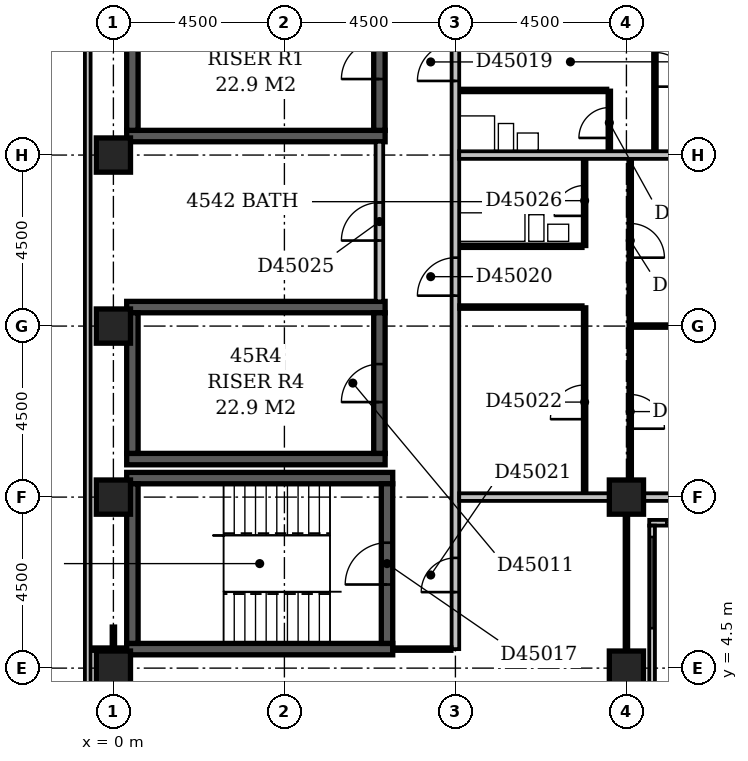
"""IFC4 building model, lengths in metres.
Left out: names, types, materials, properties, quantities, classifications, styles, units other than length and angle.
Written with IfcOpenShell. Run it as: python <this file> out.ifc"""

import sys

from ifc_helpers import new_model, si_unit, direction, frame, frame_2d, origin, origin_2d, place, context, subcontext, project, spatial, rectangle, extrude, element, fill, save


model = new_model("IFC4")
c1 = context("Model", 3, precision=1e-05, world=origin(), true_north=direction((0.0, 1.0)))
c2 = subcontext(c1, "Body", "Model", "MODEL_VIEW")
j1 = project(units=[si_unit("LENGTHUNIT", "METRE"), si_unit("PLANEANGLEUNIT", "RADIAN")], contexts=[c1])
p1 = place(None, origin())
s1 = spatial("IfcSite", under=j1, at=p1, CompositionType="ELEMENT")
p2 = place(p1, origin())
s2 = spatial("IfcBuilding", under=s1, at=p2, CompositionType="ELEMENT")
p3 = place(p2, frame((0.0, 0.0, 179.0)))
s3 = spatial("IfcBuildingStorey", under=s2, at=p3, CompositionType="ELEMENT", Elevation=179.0)
for number, where, z_axis, x_axis in (
    (1, (0.35, 5.0, -0.3), (0.0, 0.0, 1.0), (1.0, 0.0, 0.0)),
    (2, (0.35, 9.5, -0.3), (0.0, 0.0, 1.0), (1.0, 0.0, 0.0)),
):
    element("IfcWall", number, at=place(p3, frame(where, z_axis=z_axis, x_axis=x_axis)), inside=s3, PredefinedType="SHEAR", context=c2, shape_type="SweptSolid", body=[
        extrude(rectangle(XDim=7.0, YDim=0.3, at=frame_2d((3.5, 0.0))), origin(), (0.0, 0.0, 1.0), 3.6),
    ])
for number, where, z_axis, x_axis in (
    (3, (0.35, 10.0, -0.3), (0.0, 0.0, 1.0), (1.0, 0.0, 0.0)),
    (4, (0.35, 14.0, -0.3), (0.0, 0.0, 1.0), (1.0, 0.0, 0.0)),
    (5, (0.35, 18.5, -0.3), (0.0, 0.0, 1.0), (1.0, 0.0, 0.0)),
):
    element("IfcWall", number, at=place(p3, frame(where, z_axis=z_axis, x_axis=x_axis)), inside=s3, PredefinedType="SHEAR", context=c2, shape_type="SweptSolid", body=[
        extrude(rectangle(XDim=6.8, YDim=0.3, at=frame_2d((3.4, 0.0))), origin(), (0.0, 0.0, 1.0), 3.6),
    ])
p4 = place(p3, frame((0.5, 5.15, -0.3), z_axis=(0.0, 0.0, 1.0), x_axis=(0.0, 1.0, 0.0)))
e6 = element("IfcWall", 6, at=p4, inside=s3, PredefinedType="SHEAR", context=c2, shape_type="SweptSolid", body=[
    extrude(rectangle(XDim=4.2, YDim=0.3, at=frame_2d((2.1, 0.0))), origin(), (0.0, 0.0, 1.0), 3.6),
])
for number, where, z_axis, x_axis in (
    (7, (0.5, 10.15, -0.3), (0.0, 0.0, 1.0), (0.0, 1.0, 0.0)),
    (8, (0.5, 18.65, -0.3), (0.0, 0.0, 1.0), (0.0, 1.0, 0.0)),
):
    element("IfcWall", number, at=place(p3, frame(where, z_axis=z_axis, x_axis=x_axis)), inside=s3, PredefinedType="SHEAR", context=c2, shape_type="SweptSolid", body=[
        extrude(rectangle(XDim=3.7, YDim=0.3, at=frame_2d((1.85, 0.0))), origin(), (0.0, 0.0, 1.0), 3.6),
    ])
p5 = place(p3, frame((7.0, 10.15, -0.3), z_axis=(0.0, 0.0, 1.0), x_axis=(0.0, 1.0, 0.0)))
e9 = element("IfcWall", 9, at=p5, inside=s3, PredefinedType="SHEAR", context=c2, shape_type="SweptSolid", body=[
    extrude(rectangle(XDim=3.7, YDim=0.3, at=frame_2d((1.85, 0.0))), origin(), (0.0, 0.0, 1.0), 3.6),
])
p6 = place(p5, frame((1.35, 0.0, 0.3)))
e10 = element("IfcOpeningElement", 10, at=p6, cuts=e9, PredefinedType="OPENING", context=c2, shape_type="SweptSolid", body=[
    extrude(rectangle(XDim=1.0, YDim=2.1, at=frame_2d((0.5, 1.05))), frame((0.0, 0.162, 0.0), z_axis=(0.0, -1.0, 0.0), x_axis=(1.0, 0.0, 0.0)), (0.0, 0.0, 1.0), 0.324),
])
p7 = place(p3, frame((7.0, 18.65, -0.3), z_axis=(0.0, 0.0, 1.0), x_axis=(0.0, 1.0, 0.0)))
e11 = element("IfcWall", 11, at=p7, inside=s3, PredefinedType="SHEAR", context=c2, shape_type="SweptSolid", body=[
    extrude(rectangle(XDim=3.7, YDim=0.3, at=frame_2d((1.85, 0.0))), origin(), (0.0, 0.0, 1.0), 3.6),
])
p8 = place(p7, frame((1.35, 0.0, 0.3)))
e12 = element("IfcOpeningElement", 12, at=p8, cuts=e11, PredefinedType="OPENING", context=c2, shape_type="SweptSolid", body=[
    extrude(rectangle(XDim=1.0, YDim=2.1, at=frame_2d((0.5, 1.05))), frame((0.0, 0.162, 0.0), z_axis=(0.0, -1.0, 0.0), x_axis=(1.0, 0.0, 0.0)), (0.0, 0.0, 1.0), 0.324),
])
p9 = place(p3, frame((7.2, 5.15, -0.3), z_axis=(0.0, 0.0, 1.0), x_axis=(0.0, 1.0, 0.0)))
e13 = element("IfcWall", 13, at=p9, inside=s3, PredefinedType="SHEAR", context=c2, shape_type="SweptSolid", body=[
    extrude(rectangle(XDim=4.2, YDim=0.3, at=frame_2d((2.1, 0.0))), origin(), (0.0, 0.0, 1.0), 3.6),
])
p10 = place(p9, frame((1.55, 0.0, 0.3)))
e14 = element("IfcOpeningElement", 14, at=p10, cuts=e13, PredefinedType="OPENING", context=c2, shape_type="SweptSolid", body=[
    extrude(rectangle(XDim=1.1, YDim=2.1, at=frame_2d((0.55, 1.05))), frame((0.0, 0.162, 0.0), z_axis=(0.0, -1.0, 0.0), x_axis=(1.0, 0.0, 0.0)), (0.0, 0.0, 1.0), 0.324),
])
for number, where, z_axis, x_axis in (
    (15, (0.0, 4.5, -0.3), (0.0, 0.0, 1.0), (1.0, 0.0, 0.0)),
    (16, (13.5, 4.5, -0.3), (0.0, 0.0, 1.0), (1.0, 0.0, 0.0)),
    (17, (0.0, 9.0, -0.3), (0.0, 0.0, 1.0), (1.0, 0.0, 0.0)),
    (18, (13.5, 9.0, -0.3), (0.0, 0.0, 1.0), (1.0, 0.0, 0.0)),
    (19, (0.0, 13.5, -0.3), (0.0, 0.0, 1.0), (1.0, 0.0, 0.0)),
    (20, (0.0, 18.0, -0.3), (0.0, 0.0, 1.0), (1.0, 0.0, 0.0)),
):
    element("IfcColumn", number, at=place(p3, frame(where, z_axis=z_axis, x_axis=x_axis)), inside=s3, PredefinedType="COLUMN", context=c2, shape_type="SweptSolid", body=[
        extrude(rectangle(XDim=0.9, YDim=0.9, at=origin_2d()), origin(), (0.0, 0.0, 1.0), 3.6),
    ])
p11 = place(p3, frame((14.175, 3.9, 0.0), z_axis=(0.0, 0.0, 1.0), x_axis=(0.0, 1.0, 0.0)))
e21 = element("IfcWall", 21, at=p11, inside=s3, PredefinedType="STANDARD", context=c2, shape_type="SweptSolid", body=[
    extrude(rectangle(XDim=4.35, YDim=0.15, at=frame_2d((2.175, 0.0))), origin(), (0.0, 0.0, 1.0), 2.7),
])
p12 = place(p11, frame((1.65, 0.0, 0.6)))
e22 = element("IfcOpeningElement", 22, at=p12, cuts=e21, PredefinedType="OPENING", context=c2, shape_type="SweptSolid", body=[
    extrude(rectangle(XDim=2.4, YDim=1.8, at=frame_2d((1.2, 0.9))), frame((0.0, 0.087, 0.0), z_axis=(0.0, -1.0, 0.0), x_axis=(1.0, 0.0, 0.0)), (0.0, 0.0, 1.0), 0.174),
])
p13 = place(p3, frame((14.1, 8.325, 0.0), z_axis=(0.0, 0.0, 1.0), x_axis=(1.0, 0.0, 0.0)))
e23 = element("IfcWall", 23, at=p13, inside=s3, PredefinedType="STANDARD", context=c2, shape_type="SweptSolid", body=[
    extrude(rectangle(XDim=4.65, YDim=0.15, at=frame_2d((2.325, 0.0))), origin(), (0.0, 0.0, 1.0), 2.7),
])
p14 = place(p13, frame((0.45, 0.0, 0.6)))
e24 = element("IfcOpeningElement", 24, at=p14, cuts=e23, PredefinedType="OPENING", context=c2, shape_type="SweptSolid", body=[
    extrude(rectangle(XDim=2.4, YDim=1.8, at=frame_2d((1.2, 0.9))), frame((0.0, 0.087, 0.0), z_axis=(0.0, -1.0, 0.0), x_axis=(1.0, 0.0, 0.0)), (0.0, 0.0, 1.0), 0.174),
])
p15 = place(p3, frame((-0.675, 59.1, 0.0), z_axis=(0.0, 0.0, 1.0), x_axis=(0.0, -1.0, 0.0)))
e25 = element("IfcWall", 25, at=p15, inside=s3, PredefinedType="STANDARD", context=c2, shape_type="SweptSolid", body=[
    extrude(rectangle(XDim=55.35, YDim=0.15, at=frame_2d((27.675, 0.0))), origin(), (0.0, 0.0, 1.0), 2.7),
])
p16 = place(p3, frame((0.0, 4.95, 0.0), z_axis=(0.0, 0.0, 1.0), x_axis=(0.0, 1.0, 0.0)))
e26 = element("IfcWall", 26, at=p16, inside=s3, PredefinedType="PARTITIONING", context=c2, shape_type="SweptSolid", body=[
    extrude(rectangle(XDim=0.65, YDim=0.1, at=frame_2d((0.325, 0.0))), origin(), (0.0, 0.0, 1.0), 2.7),
])
p17 = place(p3, frame((13.5, 4.95, 0.0), z_axis=(0.0, 0.0, 1.0), x_axis=(0.0, 1.0, 0.0)))
e27 = element("IfcWall", 27, at=p17, inside=s3, PredefinedType="PARTITIONING", context=c2, shape_type="SweptSolid", body=[
    extrude(rectangle(XDim=3.6, YDim=0.1, at=frame_2d((1.8, 0.0))), origin(), (0.0, 0.0, 1.0), 2.7),
])
p18 = place(p3, frame((-0.6, 5.0, 0.0), z_axis=(0.0, 0.0, 1.0), x_axis=(1.0, 0.0, 0.0)))
e28 = element("IfcWall", 28, at=p18, inside=s3, PredefinedType="PARTITIONING", context=c2, shape_type="SweptSolid", body=[
    extrude(rectangle(XDim=0.951, YDim=0.1, at=frame_2d((0.476, 0.0))), origin(), (0.0, 0.0, 1.0), 3.3),
])
p19 = place(p3, frame((7.349, 5.0, 0.0), z_axis=(0.0, 0.0, 1.0), x_axis=(1.0, 0.0, 0.0)))
e29 = element("IfcWall", 29, at=p19, inside=s3, PredefinedType="PARTITIONING", context=c2, shape_type="SweptSolid", body=[
    extrude(rectangle(XDim=1.551, YDim=0.1, at=frame_2d((0.775, 0.0))), origin(), (0.0, 0.0, 1.0), 3.3),
])
p20 = place(p3, frame((9.0, 5.0, 0.0), z_axis=(0.0, 0.0, 1.0), x_axis=(0.0, 1.0, 0.0)))
e30 = element("IfcWall", 30, at=p20, inside=s3, PredefinedType="PARTITIONING", context=c2, shape_type="SweptSolid", body=[
    extrude(rectangle(XDim=31.0, YDim=0.2, at=frame_2d((15.5, 0.0))), origin(), (0.0, 0.0, 1.0), 3.3),
])
p21 = place(p20, frame((17.8, 0.0, 0.0)))
e31 = element("IfcOpeningElement", 31, at=p21, cuts=e30, PredefinedType="OPENING", context=c2, shape_type="SweptSolid", body=[
    extrude(rectangle(XDim=1.0, YDim=2.1, at=frame_2d((0.5, 1.05))), frame((0.0, 0.112, 0.0), z_axis=(0.0, -1.0, 0.0), x_axis=(1.0, 0.0, 0.0)), (0.0, 0.0, 1.0), 0.224),
])
p22 = place(p20, frame((14.95, 0.0, 0.0)))
e32 = element("IfcOpeningElement", 32, at=p22, cuts=e30, PredefinedType="OPENING", context=c2, shape_type="SweptSolid", body=[
    extrude(rectangle(XDim=1.0, YDim=2.1, at=frame_2d((0.5, 1.05))), frame((0.0, 0.112, 0.0), z_axis=(0.0, -1.0, 0.0), x_axis=(1.0, 0.0, 0.0)), (0.0, 0.0, 1.0), 0.224),
])
p23 = place(p20, frame((9.3, 0.0, 0.0)))
e33 = element("IfcOpeningElement", 33, at=p23, cuts=e30, PredefinedType="OPENING", context=c2, shape_type="SweptSolid", body=[
    extrude(rectangle(XDim=1.0, YDim=2.1, at=frame_2d((0.5, 1.05))), frame((0.0, 0.112, 0.0), z_axis=(0.0, -1.0, 0.0), x_axis=(1.0, 0.0, 0.0)), (0.0, 0.0, 1.0), 0.224),
])
p24 = place(p20, frame((1.5, 0.0, 0.0)))
e34 = element("IfcOpeningElement", 34, at=p24, cuts=e30, PredefinedType="OPENING", context=c2, shape_type="SweptSolid", body=[
    extrude(rectangle(XDim=0.9, YDim=2.1, at=frame_2d((0.45, 1.05))), frame((0.0, 0.112, 0.0), z_axis=(0.0, -1.0, 0.0), x_axis=(1.0, 0.0, 0.0)), (0.0, 0.0, 1.0), 0.224),
])
p25 = place(p3, frame((9.1, 9.0, 0.0), z_axis=(0.0, 0.0, 1.0), x_axis=(1.0, 0.0, 0.0)))
e35 = element("IfcWall", 35, at=p25, inside=s3, PredefinedType="PARTITIONING", context=c2, shape_type="SweptSolid", body=[
    extrude(rectangle(XDim=3.95, YDim=0.2, at=frame_2d((1.975, 0.0))), origin(), (0.0, 0.0, 1.0), 3.3),
])
p26 = place(p3, frame((13.95, 9.0, 0.0), z_axis=(0.0, 0.0, 1.0), x_axis=(1.0, 0.0, 0.0)))
e36 = element("IfcWall", 36, at=p26, inside=s3, PredefinedType="PARTITIONING", context=c2, shape_type="SweptSolid", body=[
    extrude(rectangle(XDim=3.6, YDim=0.2, at=frame_2d((1.8, 0.0))), origin(), (0.0, 0.0, 1.0), 2.7),
])
p27 = place(p3, frame((12.4, 9.1, 0.0), z_axis=(0.0, 0.0, 1.0), x_axis=(0.0, 1.0, 0.0)))
e37 = element("IfcWall", 37, at=p27, inside=s3, PredefinedType="PARTITIONING", context=c2, shape_type="SweptSolid", body=[
    extrude(rectangle(XDim=4.9, YDim=0.1, at=frame_2d((2.45, 0.0))), origin(), (0.0, 0.0, 1.0), 3.3),
])
p28 = place(p27, frame((1.95, 0.0, 0.0)))
e38 = element("IfcOpeningElement", 38, at=p28, cuts=e37, PredefinedType="OPENING", context=c2, shape_type="SweptSolid", body=[
    extrude(rectangle(XDim=0.9, YDim=2.1, at=frame_2d((0.45, 1.05))), frame((0.0, 0.062, 0.0), z_axis=(0.0, -1.0, 0.0), x_axis=(1.0, 0.0, 0.0)), (0.0, 0.0, 1.0), 0.124),
])
p29 = place(p3, frame((13.6, 9.45, 0.0), z_axis=(0.0, 0.0, 1.0), x_axis=(0.0, 1.0, 0.0)))
e39 = element("IfcWall", 39, at=p29, inside=s3, PredefinedType="PARTITIONING", context=c2, shape_type="SweptSolid", body=[
    extrude(rectangle(XDim=8.45, YDim=0.1, at=frame_2d((4.225, 0.0))), origin(), (0.0, 0.0, 1.0), 3.3),
])
p30 = place(p29, frame((1.35, 0.0, 0.0)))
e40 = element("IfcOpeningElement", 40, at=p30, cuts=e39, PredefinedType="OPENING", context=c2, shape_type="SweptSolid", body=[
    extrude(rectangle(XDim=0.9, YDim=2.1, at=frame_2d((0.45, 1.05))), frame((0.0, 0.062, 0.0), z_axis=(0.0, -1.0, 0.0), x_axis=(1.0, 0.0, 0.0)), (0.0, 0.0, 1.0), 0.124),
])
p31 = place(p29, frame((5.85, 0.0, 0.0)))
e41 = element("IfcOpeningElement", 41, at=p31, cuts=e39, PredefinedType="OPENING", context=c2, shape_type="SweptSolid", body=[
    extrude(rectangle(XDim=0.9, YDim=2.1, at=frame_2d((0.45, 1.05))), frame((0.0, 0.062, 0.0), z_axis=(0.0, -1.0, 0.0), x_axis=(1.0, 0.0, 0.0)), (0.0, 0.0, 1.0), 0.124),
])
p32 = place(p3, frame((13.65, 13.5, 0.0), z_axis=(0.0, 0.0, 1.0), x_axis=(1.0, 0.0, 0.0)))
e42 = element("IfcWall", 42, at=p32, inside=s3, PredefinedType="PARTITIONING", context=c2, shape_type="SweptSolid", body=[
    extrude(rectangle(XDim=3.9, YDim=0.1, at=frame_2d((1.95, 0.0))), origin(), (0.0, 0.0, 1.0), 3.3),
])
p33 = place(p3, frame((9.1, 14.0, 0.0), z_axis=(0.0, 0.0, 1.0), x_axis=(1.0, 0.0, 0.0)))
e43 = element("IfcWall", 43, at=p33, inside=s3, PredefinedType="PARTITIONING", context=c2, shape_type="SweptSolid", body=[
    extrude(rectangle(XDim=3.25, YDim=0.1, at=frame_2d((1.625, 0.0))), origin(), (0.0, 0.0, 1.0), 3.3),
])
p34 = place(p3, frame((7.0, 14.15, 0.0), z_axis=(0.0, 0.0, 1.0), x_axis=(0.0, 1.0, 0.0)))
e44 = element("IfcWall", 44, at=p34, inside=s3, PredefinedType="PARTITIONING", context=c2, shape_type="SweptSolid", body=[
    extrude(rectangle(XDim=4.2, YDim=0.2, at=frame_2d((2.1, 0.0))), origin(), (0.0, 0.0, 1.0), 3.3),
])
p35 = place(p34, frame((1.6, 0.0, 0.0)))
e45 = element("IfcOpeningElement", 45, at=p35, cuts=e44, PredefinedType="OPENING", context=c2, shape_type="SweptSolid", body=[
    extrude(rectangle(XDim=1.0, YDim=2.1, at=frame_2d((0.5, 1.05))), frame((0.0, 0.112, 0.0), z_axis=(0.0, -1.0, 0.0), x_axis=(1.0, 0.0, 0.0)), (0.0, 0.0, 1.0), 0.224),
])
p36 = place(p3, frame((9.1, 15.6, 0.0), z_axis=(0.0, 0.0, 1.0), x_axis=(1.0, 0.0, 0.0)))
e46 = element("IfcWall", 46, at=p36, inside=s3, PredefinedType="PLUMBINGWALL", context=c2, shape_type="SweptSolid", body=[
    extrude(rectangle(XDim=3.25, YDim=0.1, at=frame_2d((1.625, 0.0))), origin(), (0.0, 0.0, 1.0), 3.3),
])
p37 = place(p3, frame((12.4, 15.6, 0.0), z_axis=(0.0, 0.0, 1.0), x_axis=(0.0, 1.0, 0.0)))
e47 = element("IfcWall", 47, at=p37, inside=s3, PredefinedType="PARTITIONING", context=c2, shape_type="SweptSolid", body=[
    extrude(rectangle(XDim=2.3, YDim=0.1, at=frame_2d((1.15, 0.0))), origin(), (0.0, 0.0, 1.0), 3.3),
])
p38 = place(p37, frame((0.8, 0.0, 0.0)))
e48 = element("IfcOpeningElement", 48, at=p38, cuts=e47, PredefinedType="OPENING", context=c2, shape_type="SweptSolid", body=[
    extrude(rectangle(XDim=0.8, YDim=2.1, at=frame_2d((0.4, 1.05))), frame((0.0, 0.062, 0.0), z_axis=(0.0, -1.0, 0.0), x_axis=(1.0, 0.0, 0.0)), (0.0, 0.0, 1.0), 0.124),
])
p39 = place(p3, frame((9.1, 18.0, 0.0), z_axis=(0.0, 0.0, 1.0), x_axis=(1.0, 0.0, 0.0)))
e49 = element("IfcWall", 49, at=p39, inside=s3, PredefinedType="PARTITIONING", context=c2, shape_type="SweptSolid", body=[
    extrude(rectangle(XDim=8.45, YDim=0.2, at=frame_2d((4.225, 0.0))), origin(), (0.0, 0.0, 1.0), 2.6),
])
p40 = place(p3, frame((13.05, 18.1, 0.0), z_axis=(0.0, 0.0, 1.0), x_axis=(0.0, 1.0, 0.0)))
e50 = element("IfcWall", 50, at=p40, inside=s3, PredefinedType="PARTITIONING", context=c2, shape_type="SweptSolid", body=[
    extrude(rectangle(XDim=1.6, YDim=0.1, at=frame_2d((0.8, 0.0))), origin(), (0.0, 0.0, 1.0), 3.3),
])
p41 = place(p40, frame((0.35, 0.0, 0.0)))
e51 = element("IfcOpeningElement", 51, at=p41, cuts=e50, PredefinedType="OPENING", context=c2, shape_type="SweptSolid", body=[
    extrude(rectangle(XDim=0.8, YDim=2.1, at=frame_2d((0.4, 1.05))), frame((0.0, 0.062, 0.0), z_axis=(0.0, -1.0, 0.0), x_axis=(1.0, 0.0, 0.0)), (0.0, 0.0, 1.0), 0.124),
])
p42 = place(p3, frame((14.25, 18.1, 0.0), z_axis=(0.0, 0.0, 1.0), x_axis=(0.0, 1.0, 0.0)))
e52 = element("IfcWall", 52, at=p42, inside=s3, PredefinedType="PARTITIONING", context=c2, shape_type="SweptSolid", body=[
    extrude(rectangle(XDim=4.3, YDim=0.1, at=frame_2d((2.15, 0.0))), origin(), (0.0, 0.0, 1.0), 3.3),
])
p43 = place(p42, frame((1.7, 0.0, 0.0)))
e53 = element("IfcOpeningElement", 53, at=p43, cuts=e52, PredefinedType="OPENING", context=c2, shape_type="SweptSolid", body=[
    extrude(rectangle(XDim=0.9, YDim=2.1, at=frame_2d((0.45, 1.05))), frame((0.0, 0.062, 0.0), z_axis=(0.0, -1.0, 0.0), x_axis=(1.0, 0.0, 0.0)), (0.0, 0.0, 1.0), 0.124),
])
p44 = place(p3, frame((9.1, 19.7, 0.0), z_axis=(0.0, 0.0, 1.0), x_axis=(1.0, 0.0, 0.0)))
e54 = element("IfcWall", 54, at=p44, inside=s3, PredefinedType="PLUMBINGWALL", context=c2, shape_type="SweptSolid", body=[
    extrude(rectangle(XDim=3.9, YDim=0.1, at=frame_2d((1.95, 0.0))), origin(), (0.0, 0.0, 1.0), 3.3),
])
p45 = place(p12, origin())
e55 = element("IfcWindow", 55, at=p45, inside=s3, PartitioningType="SINGLE_PANEL", PredefinedType="WINDOW", context=c2, shape_type="SweptSolid", body=[
    extrude(rectangle(XDim=2.4, YDim=1.8, at=frame_2d((1.2, 0.9))), frame((0.0, 0.03, 0.0), z_axis=(0.0, -1.0, 0.0), x_axis=(1.0, 0.0, 0.0)), (0.0, 0.0, 1.0), 0.06),
])
fill(e22, e55)
p46 = place(p14, origin())
e56 = element("IfcWindow", 56, at=p46, inside=s3, PartitioningType="SINGLE_PANEL", PredefinedType="WINDOW", context=c2, shape_type="SweptSolid", body=[
    extrude(rectangle(XDim=2.4, YDim=1.8, at=frame_2d((1.2, 0.9))), frame((0.0, 0.03, 0.0), z_axis=(0.0, -1.0, 0.0), x_axis=(1.0, 0.0, 0.0)), (0.0, 0.0, 1.0), 0.06),
])
fill(e24, e56)
p47 = place(p8, origin())
e57 = element("IfcDoor", 57, at=p47, inside=s3, OperationType="SINGLE_SWING_LEFT", PredefinedType="DOOR", context=c2, shape_type="SweptSolid", body=[
    extrude(rectangle(XDim=1.0, YDim=2.1, at=frame_2d((0.5, 1.05))), frame((0.0, 0.025, 0.0), z_axis=(0.0, -1.0, 0.0), x_axis=(1.0, 0.0, 0.0)), (0.0, 0.0, 1.0), 0.05),
])
fill(e12, e57)
p48 = place(p6, origin())
e58 = element("IfcDoor", 58, at=p48, inside=s3, OperationType="SINGLE_SWING_LEFT", PredefinedType="DOOR", context=c2, shape_type="SweptSolid", body=[
    extrude(rectangle(XDim=1.0, YDim=2.1, at=frame_2d((0.5, 1.05))), frame((0.0, 0.025, 0.0), z_axis=(0.0, -1.0, 0.0), x_axis=(1.0, 0.0, 0.0)), (0.0, 0.0, 1.0), 0.05),
])
fill(e10, e58)
p49 = place(p10, origin())
e59 = element("IfcDoor", 59, at=p49, inside=s3, OperationType="SINGLE_SWING_LEFT", PredefinedType="DOOR", context=c2, shape_type="SweptSolid", body=[
    extrude(rectangle(XDim=1.1, YDim=2.1, at=frame_2d((0.55, 1.05))), frame((0.0, 0.025, 0.0), z_axis=(0.0, -1.0, 0.0), x_axis=(1.0, 0.0, 0.0)), (0.0, 0.0, 1.0), 0.05),
])
fill(e14, e59)
p50 = place(p22, origin())
e60 = element("IfcDoor", 60, at=p50, inside=s3, OperationType="SINGLE_SWING_LEFT", PredefinedType="DOOR", context=c2, shape_type="SweptSolid", body=[
    extrude(rectangle(XDim=1.0, YDim=2.1, at=frame_2d((0.5, 1.05))), frame((0.0, 0.025, 0.0), z_axis=(0.0, -1.0, 0.0), x_axis=(1.0, 0.0, 0.0)), (0.0, 0.0, 1.0), 0.05),
])
fill(e32, e60)
p51 = place(p23, origin())
e61 = element("IfcDoor", 61, at=p51, inside=s3, OperationType="SINGLE_SWING_LEFT", PredefinedType="DOOR", context=c2, shape_type="SweptSolid", body=[
    extrude(rectangle(XDim=1.0, YDim=2.1, at=frame_2d((0.5, 1.05))), frame((0.0, 0.025, 0.0), z_axis=(0.0, -1.0, 0.0), x_axis=(1.0, 0.0, 0.0)), (0.0, 0.0, 1.0), 0.05),
])
fill(e33, e61)
p52 = place(p24, origin())
e62 = element("IfcDoor", 62, at=p52, inside=s3, OperationType="SINGLE_SWING_LEFT", PredefinedType="DOOR", context=c2, shape_type="SweptSolid", body=[
    extrude(rectangle(XDim=0.9, YDim=2.1, at=frame_2d((0.45, 1.05))), frame((0.0, 0.025, 0.0), z_axis=(0.0, -1.0, 0.0), x_axis=(1.0, 0.0, 0.0)), (0.0, 0.0, 1.0), 0.05),
])
fill(e34, e62)
p53 = place(p28, origin())
e63 = element("IfcDoor", 63, at=p53, inside=s3, OperationType="SINGLE_SWING_LEFT", PredefinedType="DOOR", context=c2, shape_type="SweptSolid", body=[
    extrude(rectangle(XDim=0.9, YDim=2.1, at=frame_2d((0.45, 1.05))), frame((0.0, 0.025, 0.0), z_axis=(0.0, -1.0, 0.0), x_axis=(1.0, 0.0, 0.0)), (0.0, 0.0, 1.0), 0.05),
])
fill(e38, e63)
p54 = place(p30, frame((0.9, 0.0, 0.0), z_axis=(0.0, 0.0, 1.0), x_axis=(-1.0, 0.0, 0.0)))
e64 = element("IfcDoor", 64, at=p54, inside=s3, OperationType="SINGLE_SWING_RIGHT", PredefinedType="DOOR", context=c2, shape_type="SweptSolid", body=[
    extrude(rectangle(XDim=0.9, YDim=2.1, at=frame_2d((0.45, 1.05))), frame((0.0, 0.025, 0.0), z_axis=(0.0, -1.0, 0.0), x_axis=(1.0, 0.0, 0.0)), (0.0, 0.0, 1.0), 0.05),
])
fill(e40, e64)
p55 = place(p31, frame((0.9, 0.0, 0.0), z_axis=(0.0, 0.0, 1.0), x_axis=(-1.0, 0.0, 0.0)))
e65 = element("IfcDoor", 65, at=p55, inside=s3, OperationType="SINGLE_SWING_RIGHT", PredefinedType="DOOR", context=c2, shape_type="SweptSolid", body=[
    extrude(rectangle(XDim=0.9, YDim=2.1, at=frame_2d((0.45, 1.05))), frame((0.0, 0.025, 0.0), z_axis=(0.0, -1.0, 0.0), x_axis=(1.0, 0.0, 0.0)), (0.0, 0.0, 1.0), 0.05),
])
fill(e41, e65)
p56 = place(p35, origin())
e66 = element("IfcDoor", 66, at=p56, inside=s3, OperationType="SINGLE_SWING_LEFT", PredefinedType="DOOR", context=c2, shape_type="SweptSolid", body=[
    extrude(rectangle(XDim=1.0, YDim=2.1, at=frame_2d((0.5, 1.05))), frame((0.0, 0.025, 0.0), z_axis=(0.0, -1.0, 0.0), x_axis=(1.0, 0.0, 0.0)), (0.0, 0.0, 1.0), 0.05),
])
fill(e45, e66)
p57 = place(p38, origin())
e67 = element("IfcDoor", 67, at=p57, inside=s3, OperationType="SINGLE_SWING_LEFT", PredefinedType="DOOR", context=c2, shape_type="SweptSolid", body=[
    extrude(rectangle(XDim=0.8, YDim=2.1, at=frame_2d((0.4, 1.05))), frame((0.0, 0.025, 0.0), z_axis=(0.0, -1.0, 0.0), x_axis=(1.0, 0.0, 0.0)), (0.0, 0.0, 1.0), 0.05),
])
fill(e48, e67)
p58 = place(p41, origin())
e68 = element("IfcDoor", 68, at=p58, inside=s3, OperationType="SINGLE_SWING_LEFT", PredefinedType="DOOR", context=c2, shape_type="SweptSolid", body=[
    extrude(rectangle(XDim=0.8, YDim=2.1, at=frame_2d((0.4, 1.05))), frame((0.0, 0.025, 0.0), z_axis=(0.0, -1.0, 0.0), x_axis=(1.0, 0.0, 0.0)), (0.0, 0.0, 1.0), 0.05),
])
fill(e51, e68)
p59 = place(p43, frame((0.9, 0.0, 0.0), z_axis=(0.0, 0.0, 1.0), x_axis=(-1.0, 0.0, 0.0)))
e69 = element("IfcDoor", 69, at=p59, inside=s3, OperationType="SINGLE_SWING_RIGHT", PredefinedType="DOOR", context=c2, shape_type="SweptSolid", body=[
    extrude(rectangle(XDim=0.9, YDim=2.1, at=frame_2d((0.45, 1.05))), frame((0.0, 0.025, 0.0), z_axis=(0.0, -1.0, 0.0), x_axis=(1.0, 0.0, 0.0)), (0.0, 0.0, 1.0), 0.05),
])
fill(e53, e69)
save(model, sys.argv[1])
